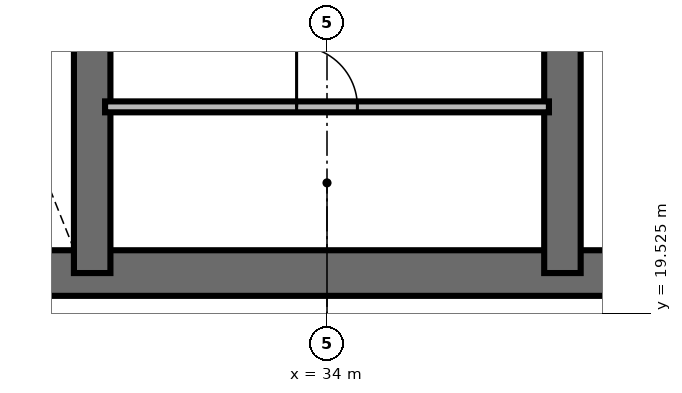
"""IFC4 building model, lengths in metres.
Left out: names, types, materials, properties, quantities, classifications, styles, units other than length and angle.
Written with IfcOpenShell. Run it as: python <this file> out.ifc"""

import sys

from ifc_helpers import new_model, si_unit, direction, frame, frame_2d, origin, place, context, subcontext, project, spatial, rectangle, extrude, element, fill, save


model = new_model("IFC4")
c1 = context("Model", 3, precision=1e-05, world=origin(), true_north=direction((0.0, 1.0)))
c2 = subcontext(c1, "Body", "Model", "MODEL_VIEW")
j1 = project(units=[si_unit("LENGTHUNIT", "METRE"), si_unit("PLANEANGLEUNIT", "RADIAN")], contexts=[c1])
p1 = place(None, origin())
s1 = spatial("IfcSite", under=j1, at=p1, CompositionType="ELEMENT")
p2 = place(p1, origin())
s2 = spatial("IfcBuilding", under=s1, at=p2, CompositionType="ELEMENT")
p3 = place(p2, frame((0.0, 0.0, 206.0)))
s3 = spatial("IfcBuildingStorey", under=s2, at=p3, CompositionType="ELEMENT", Elevation=206.0)
p4 = place(p3, frame((26.072, 20.187, 0.0), z_axis=(0.0, 0.0, 1.0), x_axis=(1.0, 0.0, 0.0)))
e1 = element("IfcWall", 1, at=p4, inside=s3, PredefinedType="SHEAR", context=c2, shape_type="SweptSolid", body=[
    extrude(rectangle(XDim=15.866, YDim=0.75, at=frame_2d((7.933, 0.0))), origin(), (0.0, 0.0, 1.0), 3.6),
])
for number, where, z_axis, x_axis in (
    (2, (30.138, 20.187, 0.0), (0.0, 0.0, 1.0), (0.0, 1.0, 0.0)),
    (3, (37.872, 20.187, 0.0), (0.0, 0.0, 1.0), (0.0, 1.0, 0.0)),
):
    element("IfcWall", number, at=place(p3, frame(where, z_axis=z_axis, x_axis=x_axis)), inside=s3, PredefinedType="SHEAR", context=c2, shape_type="SweptSolid", body=[
        extrude(rectangle(XDim=9.826, YDim=0.6, at=frame_2d((4.913, 0.0))), origin(), (0.0, 0.0, 1.0), 3.6),
    ])
p5 = place(p3, frame((30.35, 22.92, 0.0), z_axis=(0.0, 0.0, 1.0), x_axis=(1.0, 0.0, 0.0)))
e4 = element("IfcWall", 4, at=p5, inside=s3, PredefinedType="PARTITIONING", context=c2, shape_type="SweptSolid", body=[
    extrude(rectangle(XDim=7.3, YDim=0.18, at=frame_2d((3.65, 0.0))), origin(), (0.0, 0.0, 1.0), 2.46),
])
p6 = place(p5, frame((3.15, 0.0, 0.0)))
e5 = element("IfcOpeningElement", 5, at=p6, cuts=e4, PredefinedType="OPENING", context=c2, shape_type="SweptSolid", body=[
    extrude(rectangle(XDim=1.0, YDim=2.15, at=frame_2d((0.5, 1.075))), frame((0.0, 0.1, 0.0), z_axis=(0.0, -1.0, 0.0), x_axis=(1.0, 0.0, 0.0)), (0.0, 0.0, 1.0), 0.2),
])
p7 = place(p6, origin())
e6 = element("IfcDoor", 6, at=p7, inside=s3, OperationType="SINGLE_SWING_LEFT", PredefinedType="DOOR", context=c2, shape_type="SweptSolid", body=[
    extrude(rectangle(XDim=1.0, YDim=2.15, at=frame_2d((0.5, 1.075))), frame((0.0, 0.025, 0.0), z_axis=(0.0, -1.0, 0.0), x_axis=(1.0, 0.0, 0.0)), (0.0, 0.0, 1.0), 0.05),
])
fill(e5, e6)
save(model, sys.argv[1])
